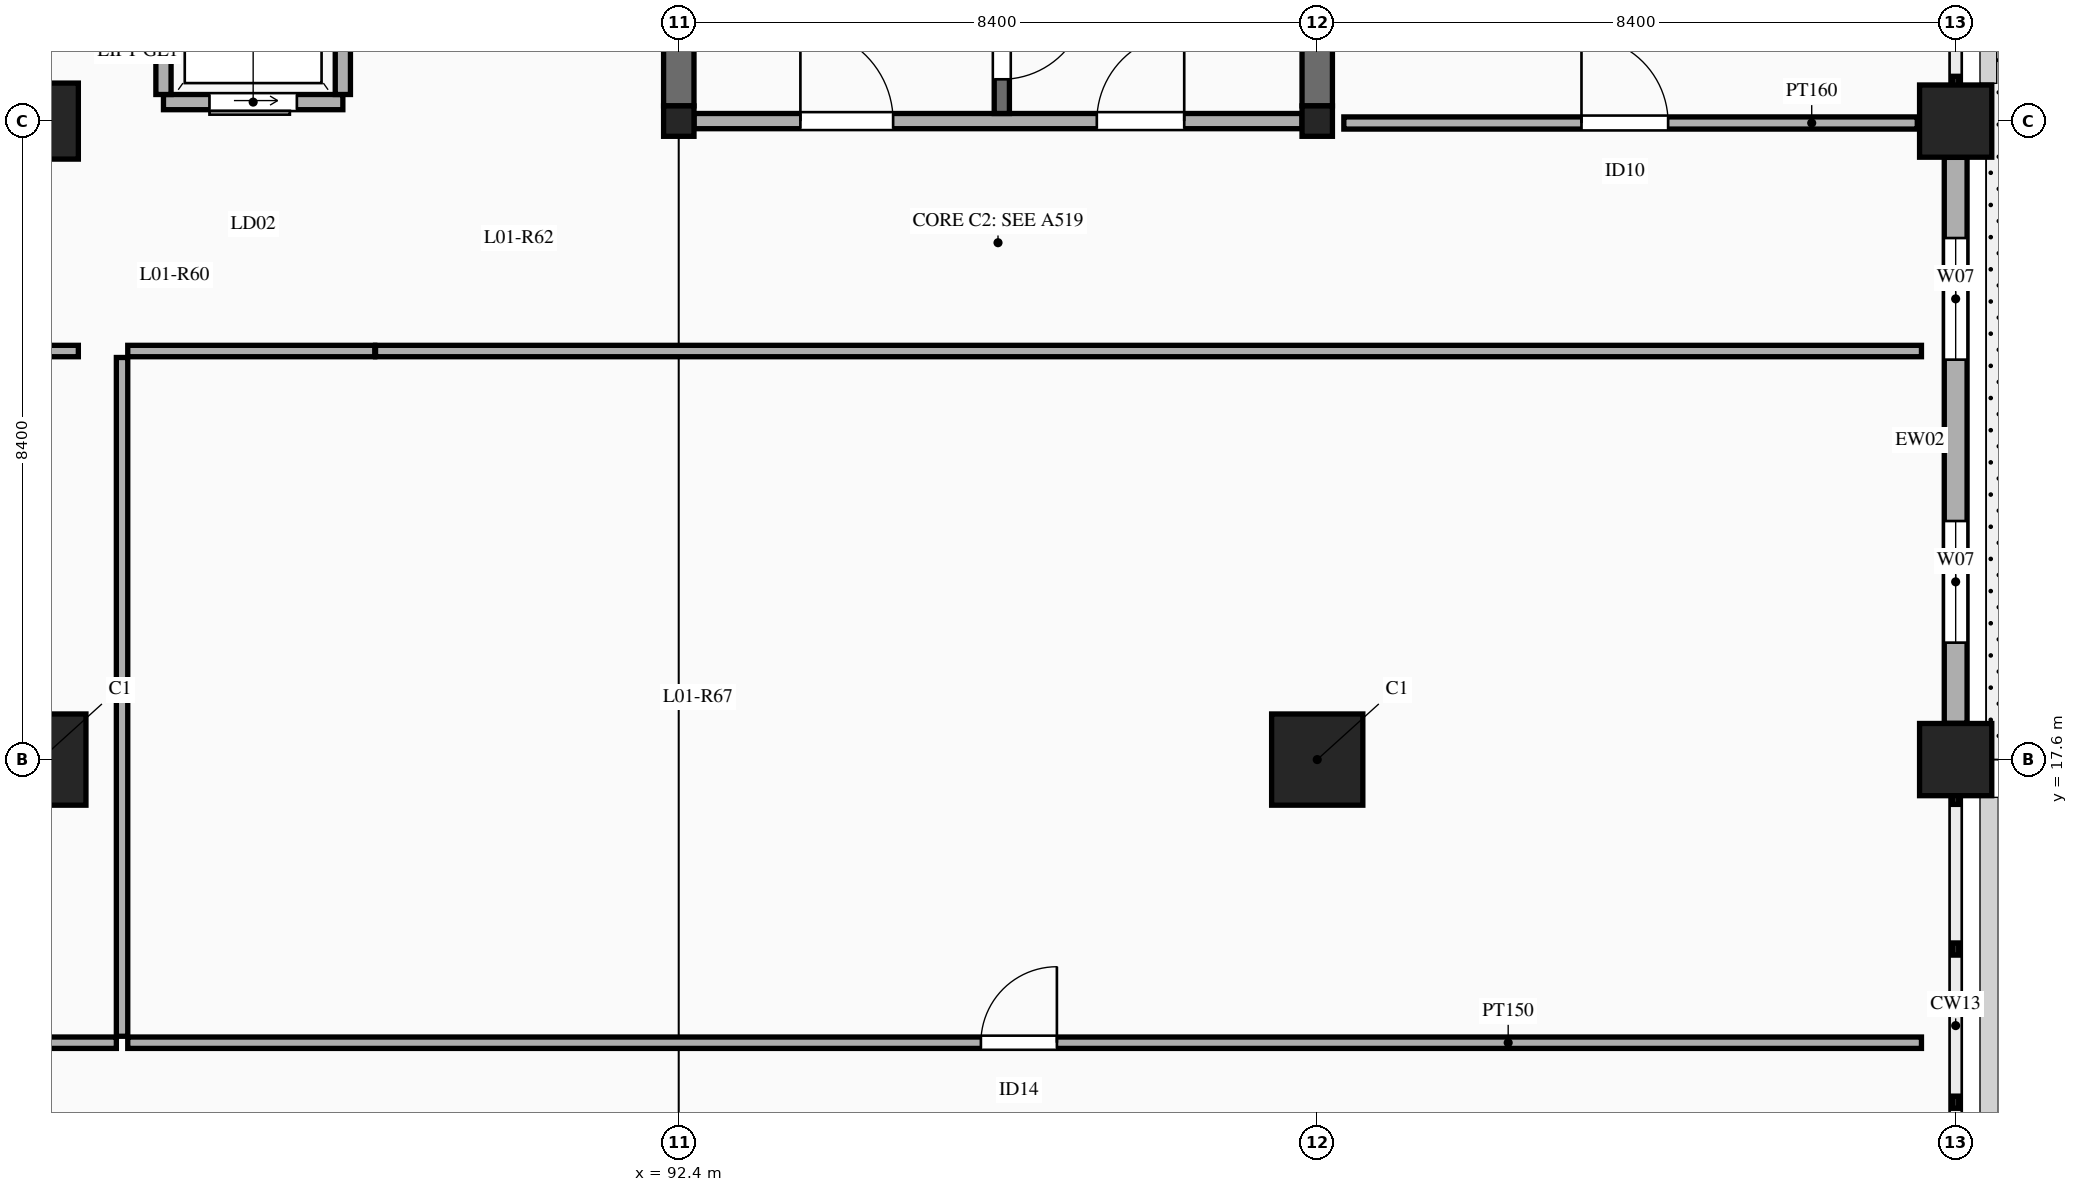
"""IFC4 building model, lengths in metres.
Left out: names, types, materials, properties, quantities, classifications, styles, units other than length and angle.
Written with IfcOpenShell. Run it as: python <this file> out.ifc"""

import sys

from ifc_helpers import new_model, si_unit, direction, frame, frame_2d, origin, origin_2d, place, context, subcontext, project, spatial, rectangle, extrude, element, fill, save


model = new_model("IFC4")
c1 = context("Model", 3, precision=1e-05, world=origin(), true_north=direction((0.0, 1.0)))
c2 = subcontext(c1, "Body", "Model", "MODEL_VIEW")
j1 = project(units=[si_unit("LENGTHUNIT", "METRE"), si_unit("PLANEANGLEUNIT", "RADIAN")], contexts=[c1])
p1 = place(None, origin())
s1 = spatial("IfcSite", under=j1, at=p1, CompositionType="ELEMENT")
p2 = place(p1, origin())
s2 = spatial("IfcBuilding", under=s1, at=p2, CompositionType="ELEMENT")
p3 = place(p2, frame((0.0, 0.0, 5.4)))
s3 = spatial("IfcBuildingStorey", under=s2, at=p3, CompositionType="ELEMENT", Elevation=5.4)
p4 = place(p3, frame((84.0, 17.6, 0.0), z_axis=(0.0, 0.0, 1.0), x_axis=(1.0, 0.0, 0.0)))
e1 = element("IfcColumn", 1, at=p4, inside=s3, PredefinedType="COLUMN", context=c2, shape_type="SweptSolid", body=[
    extrude(rectangle(XDim=1.2, YDim=1.2, at=origin_2d()), origin(), (0.0, 0.0, 1.0), 4.8),
])
p5 = place(p3, frame((84.0, 26.0, 0.0), z_axis=(0.0, 0.0, 1.0), x_axis=(1.0, 0.0, 0.0)))
e2 = element("IfcColumn", 2, at=p5, inside=s3, PredefinedType="COLUMN", context=c2, shape_type="SweptSolid", body=[
    extrude(rectangle(XDim=1.0, YDim=1.0, at=origin_2d()), origin(), (0.0, 0.0, 1.0), 4.8),
])
p6 = place(p3, frame((92.4, 26.0, 0.0), z_axis=(0.0, 0.0, 1.0), x_axis=(1.0, 0.0, 0.0)))
e3 = element("IfcColumn", 3, at=p6, inside=s3, PredefinedType="COLUMN", context=c2, shape_type="SweptSolid", body=[
    extrude(rectangle(XDim=0.4, YDim=0.4, at=origin_2d()), origin(), (0.0, 0.0, 1.0), 4.8),
])
p7 = place(p3, frame((100.8, 17.6, 0.0), z_axis=(0.0, 0.0, 1.0), x_axis=(1.0, 0.0, 0.0)))
e4 = element("IfcColumn", 4, at=p7, inside=s3, PredefinedType="COLUMN", context=c2, shape_type="SweptSolid", body=[
    extrude(rectangle(XDim=1.2, YDim=1.2, at=origin_2d()), origin(), (0.0, 0.0, 1.0), 4.8),
])
p8 = place(p3, frame((100.8, 26.0, 0.0), z_axis=(0.0, 0.0, 1.0), x_axis=(1.0, 0.0, 0.0)))
e5 = element("IfcColumn", 5, at=p8, inside=s3, PredefinedType="COLUMN", context=c2, shape_type="SweptSolid", body=[
    extrude(rectangle(XDim=0.4, YDim=0.4, at=origin_2d()), origin(), (0.0, 0.0, 1.0), 4.8),
])
for number, where, z_axis, x_axis in (
    (6, (109.2, 17.6, 0.0), (0.0, 0.0, 1.0), (1.0, 0.0, 0.0)),
    (7, (109.2, 26.0, 0.0), (0.0, 0.0, 1.0), (1.0, 0.0, 0.0)),
):
    element("IfcColumn", number, at=place(p3, frame(where, z_axis=z_axis, x_axis=x_axis)), inside=s3, PredefinedType="COLUMN", context=c2, shape_type="SweptSolid", body=[
        extrude(rectangle(XDim=0.95, YDim=0.95, at=origin_2d()), origin(), (0.0, 0.0, 1.0), 4.8),
    ])
for number, where, z_axis, x_axis in (
    (8, (92.4, 26.2, 0.0), (0.0, 0.0, 1.0), (0.0, 1.0, 0.0)),
    (9, (100.8, 26.2, 0.0), (0.0, 0.0, 1.0), (0.0, 1.0, 0.0)),
):
    element("IfcWall", number, at=place(p3, frame(where, z_axis=z_axis, x_axis=x_axis)), inside=s3, PredefinedType="SHEAR", context=c2, shape_type="SweptSolid", body=[
        extrude(rectangle(XDim=8.0, YDim=0.4, at=frame_2d((4.0, 0.0))), origin(), (0.0, 0.0, 1.0), 4.8),
    ])
p9 = place(p3, frame((109.2, 18.077, 0.0), z_axis=(0.0, 0.0, 1.0), x_axis=(0.0, 1.0, 0.0)))
e10 = element("IfcWall", 10, at=p9, inside=s3, PredefinedType="SOLIDWALL", context=c2, shape_type="SweptSolid", body=[
    extrude(rectangle(XDim=7.446, YDim=0.3, at=frame_2d((3.723, 0.0))), origin(), (0.0, 0.0, 1.0), 3.85),
])
p10 = place(p9, frame((1.062, 0.0, 0.9)))
e11 = element("IfcOpeningElement", 11, at=p10, cuts=e10, PredefinedType="OPENING", context=c2, shape_type="SweptSolid", body=[
    extrude(rectangle(XDim=1.6, YDim=2.1, at=frame_2d((0.8, 1.05))), frame((0.0, 0.16, 0.0), z_axis=(0.0, -1.0, 0.0), x_axis=(1.0, 0.0, 0.0)), (0.0, 0.0, 1.0), 0.32),
])
p11 = place(p9, frame((4.784, 0.0, 0.9)))
e12 = element("IfcOpeningElement", 12, at=p11, cuts=e10, PredefinedType="OPENING", context=c2, shape_type="SweptSolid", body=[
    extrude(rectangle(XDim=1.6, YDim=2.1, at=frame_2d((0.8, 1.05))), frame((0.0, 0.16, 0.0), z_axis=(0.0, -1.0, 0.0), x_axis=(1.0, 0.0, 0.0)), (0.0, 0.0, 1.0), 0.32),
])
p12 = place(p3, frame((92.6, 26.0, 0.0), z_axis=(0.0, 0.0, 1.0), x_axis=(1.0, 0.0, 0.0)))
e13 = element("IfcWall", 13, at=p12, inside=s3, PredefinedType="SOLIDWALL", context=c2, shape_type="SweptSolid", body=[
    extrude(rectangle(XDim=8.0, YDim=0.2, at=frame_2d((4.0, 0.0))), origin(), (0.0, 0.0, 1.0), 3.88),
])
p13 = place(p12, frame((1.4, 0.0, 0.0)))
e14 = element("IfcOpeningElement", 14, at=p13, cuts=e13, PredefinedType="OPENING", context=c2, shape_type="SweptSolid", body=[
    extrude(rectangle(XDim=1.22, YDim=2.15, at=frame_2d((0.61, 1.075))), frame((0.0, 0.11, 0.0), z_axis=(0.0, -1.0, 0.0), x_axis=(1.0, 0.0, 0.0)), (0.0, 0.0, 1.0), 0.22),
])
p14 = place(p12, frame((5.3, 0.0, 0.0)))
e15 = element("IfcOpeningElement", 15, at=p14, cuts=e13, PredefinedType="OPENING", context=c2, shape_type="SweptSolid", body=[
    extrude(rectangle(XDim=1.15, YDim=2.15, at=frame_2d((0.575, 1.075))), frame((0.0, 0.11, 0.0), z_axis=(0.0, -1.0, 0.0), x_axis=(1.0, 0.0, 0.0)), (0.0, 0.0, 1.0), 0.22),
])
p15 = place(p3, frame((96.65, 26.1, 0.0), z_axis=(0.0, 0.0, 1.0), x_axis=(0.0, 1.0, 0.0)))
e16 = element("IfcWall", 16, at=p15, inside=s3, PredefinedType="SOLIDWALL", context=c2, shape_type="SweptSolid", body=[
    extrude(rectangle(XDim=8.1, YDim=0.2, at=frame_2d((4.05, 0.0))), origin(), (0.0, 0.0, 1.0), 4.58),
])
p16 = place(p15, frame((0.45, 0.0, 0.0)))
e17 = element("IfcOpeningElement", 17, at=p16, cuts=e16, PredefinedType="OPENING", context=c2, shape_type="SweptSolid", body=[
    extrude(rectangle(XDim=1.12, YDim=2.15, at=frame_2d((0.56, 1.075))), frame((0.0, 0.11, 0.0), z_axis=(0.0, -1.0, 0.0), x_axis=(1.0, 0.0, 0.0)), (0.0, 0.0, 1.0), 0.22),
])
p17 = place(p3, frame((85.62, 26.25, 0.0), z_axis=(0.0, 0.0, 1.0), x_axis=(1.0, 0.0, 0.0)))
e18 = element("IfcWall", 18, at=p17, inside=s3, PredefinedType="SOLIDWALL", context=c2, shape_type="SweptSolid", body=[
    extrude(rectangle(XDim=2.36, YDim=0.2, at=frame_2d((1.18, 0.0))), origin(), (0.0, 0.0, 1.0), 3.88),
])
p18 = place(p17, frame((0.605, 0.0, 0.0)))
e19 = element("IfcOpeningElement", 19, at=p18, cuts=e18, PredefinedType="OPENING", context=c2, shape_type="SweptSolid", body=[
    extrude(rectangle(XDim=1.15, YDim=2.2, at=frame_2d((0.575, 1.1))), frame((0.0, 0.11, 0.0), z_axis=(0.0, -1.0, 0.0), x_axis=(1.0, 0.0, 0.0)), (0.0, 0.0, 1.0), 0.22),
])
p19 = place(p3, frame((85.62, 26.35, 0.0), z_axis=(0.0, 0.0, 1.0), x_axis=(0.0, 1.0, 0.0)))
e20 = element("IfcWall", 20, at=p19, inside=s3, PredefinedType="SOLIDWALL", context=c2, shape_type="SweptSolid", body=[
    extrude(rectangle(XDim=2.9, YDim=0.2, at=frame_2d((1.45, 0.0))), origin(), (0.0, 0.0, 1.0), 4.58),
])
p20 = place(p3, frame((87.98, 26.35, 0.0), z_axis=(0.0, 0.0, 1.0), x_axis=(0.0, 1.0, 0.0)))
e21 = element("IfcWall", 21, at=p20, inside=s3, PredefinedType="SOLIDWALL", context=c2, shape_type="SweptSolid", body=[
    extrude(rectangle(XDim=2.9, YDim=0.2, at=frame_2d((1.45, 0.0))), origin(), (0.0, 0.0, 1.0), 4.23),
])
p21 = place(p3, frame((101.15, 25.975, 0.0), z_axis=(0.0, 0.0, 1.0), x_axis=(1.0, 0.0, 0.0)))
e22 = element("IfcWall", 22, at=p21, inside=s3, PredefinedType="PARTITIONING", context=c2, shape_type="SweptSolid", body=[
    extrude(rectangle(XDim=7.545, YDim=0.16, at=frame_2d((3.772, 0.0))), origin(), (0.0, 0.0, 1.0), 2.95),
])
p22 = place(p21, frame((3.127, 0.0, 0.0)))
e23 = element("IfcOpeningElement", 23, at=p22, cuts=e22, PredefinedType="OPENING", context=c2, shape_type="SweptSolid", body=[
    extrude(rectangle(XDim=1.14, YDim=2.22, at=frame_2d((0.57, 1.11))), frame((0.0, 0.09, 0.0), z_axis=(0.0, -1.0, 0.0), x_axis=(1.0, 0.0, 0.0)), (0.0, 0.0, 1.0), 0.18),
])
p23 = place(p3, frame((76.05, 22.975, 0.0), z_axis=(0.0, 0.0, 1.0), x_axis=(1.0, 0.0, 0.0)))
e24 = element("IfcWall", 24, at=p23, inside=s3, PredefinedType="PARTITIONING", context=c2, shape_type="SweptSolid", body=[
    extrude(rectangle(XDim=8.45, YDim=0.15, at=frame_2d((4.225, 0.0))), origin(), (0.0, 0.0, 1.0), 2.95),
])
p24 = place(p3, frame((85.15, 22.975, 0.0), z_axis=(0.0, 0.0, 1.0), x_axis=(1.0, 0.0, 0.0)))
e25 = element("IfcWall", 25, at=p24, inside=s3, PredefinedType="PARTITIONING", context=c2, shape_type="SweptSolid", body=[
    extrude(rectangle(XDim=3.25, YDim=0.15, at=frame_2d((1.625, 0.0))), origin(), (0.0, 0.0, 1.0), 2.95),
])
p25 = place(p3, frame((88.41, 22.975, 0.0), z_axis=(0.0, 0.0, 1.0), x_axis=(1.0, 0.0, 0.0)))
e26 = element("IfcWall", 26, at=p25, inside=s3, PredefinedType="PARTITIONING", context=c2, shape_type="SweptSolid", body=[
    extrude(rectangle(XDim=20.34, YDim=0.15, at=frame_2d((10.17, 0.0))), origin(), (0.0, 0.0, 1.0), 2.95),
])
p26 = place(p3, frame((63.56, 13.875, 0.0), z_axis=(0.0, 0.0, 1.0), x_axis=(1.0, 0.0, 0.0)))
e27 = element("IfcWall", 27, at=p26, inside=s3, PredefinedType="PARTITIONING", context=c2, shape_type="SweptSolid", body=[
    extrude(rectangle(XDim=21.44, YDim=0.15, at=frame_2d((10.72, 0.0))), origin(), (0.0, 0.0, 1.0), 2.95),
])
p27 = place(p26, frame((9.123, 0.0, 0.0)))
e28 = element("IfcOpeningElement", 28, at=p27, cuts=e27, PredefinedType="OPENING", context=c2, shape_type="SweptSolid", body=[
    extrude(rectangle(XDim=1.24, YDim=2.2, at=frame_2d((0.62, 1.1))), frame((0.0, 0.085, 0.0), z_axis=(0.0, -1.0, 0.0), x_axis=(1.0, 0.0, 0.0)), (0.0, 0.0, 1.0), 0.17),
])
p28 = place(p3, frame((85.15, 13.875, 0.0), z_axis=(0.0, 0.0, 1.0), x_axis=(1.0, 0.0, 0.0)))
e29 = element("IfcWall", 29, at=p28, inside=s3, PredefinedType="PARTITIONING", context=c2, shape_type="SweptSolid", body=[
    extrude(rectangle(XDim=23.6, YDim=0.15, at=frame_2d((11.8, 0.0))), origin(), (0.0, 0.0, 1.0), 2.95),
])
p29 = place(p28, frame((11.225, 0.0, 0.0)))
e30 = element("IfcOpeningElement", 30, at=p29, cuts=e29, PredefinedType="OPENING", context=c2, shape_type="SweptSolid", body=[
    extrude(rectangle(XDim=1.0, YDim=2.15, at=frame_2d((0.5, 1.075))), frame((0.0, 0.085, 0.0), z_axis=(0.0, -1.0, 0.0), x_axis=(1.0, 0.0, 0.0)), (0.0, 0.0, 1.0), 0.17),
])
p30 = place(p3, frame((85.075, 13.96, 0.0), z_axis=(0.0, 0.0, 1.0), x_axis=(0.0, 1.0, 0.0)))
e31 = element("IfcWall", 31, at=p30, inside=s3, PredefinedType="PARTITIONING", context=c2, shape_type="SweptSolid", body=[
    extrude(rectangle(XDim=8.93, YDim=0.15, at=frame_2d((4.465, 0.0))), origin(), (0.0, 0.0, 1.0), 2.95),
])
p31 = place(p10, origin())
e32 = element("IfcWindow", 32, at=p31, inside=s3, PartitioningType="DOUBLE_PANEL_VERTICAL", PredefinedType="WINDOW", context=c2, shape_type="SweptSolid", body=[
    extrude(rectangle(XDim=1.6, YDim=2.1, at=frame_2d((0.8, 1.05))), frame((0.0, 0.03, 0.0), z_axis=(0.0, -1.0, 0.0), x_axis=(1.0, 0.0, 0.0)), (0.0, 0.0, 1.0), 0.06),
])
fill(e11, e32)
p32 = place(p11, origin())
e33 = element("IfcWindow", 33, at=p32, inside=s3, PartitioningType="DOUBLE_PANEL_VERTICAL", PredefinedType="WINDOW", context=c2, shape_type="SweptSolid", body=[
    extrude(rectangle(XDim=1.6, YDim=2.1, at=frame_2d((0.8, 1.05))), frame((0.0, 0.03, 0.0), z_axis=(0.0, -1.0, 0.0), x_axis=(1.0, 0.0, 0.0)), (0.0, 0.0, 1.0), 0.06),
])
fill(e12, e33)
p33 = place(p13, origin())
e34 = element("IfcDoor", 34, at=p33, inside=s3, OperationType="SINGLE_SWING_LEFT", PredefinedType="DOOR", context=c2, shape_type="SweptSolid", body=[
    extrude(rectangle(XDim=1.22, YDim=2.15, at=frame_2d((0.61, 1.075))), frame((0.0, 0.025, 0.0), z_axis=(0.0, -1.0, 0.0), x_axis=(1.0, 0.0, 0.0)), (0.0, 0.0, 1.0), 0.05),
])
fill(e14, e34)
p34 = place(p14, origin())
e35 = element("IfcDoor", 35, at=p34, inside=s3, OperationType="SINGLE_SWING_RIGHT", PredefinedType="DOOR", context=c2, shape_type="SweptSolid", body=[
    extrude(rectangle(XDim=1.15, YDim=2.15, at=frame_2d((0.575, 1.075))), frame((0.0, 0.025, 0.0), z_axis=(0.0, -1.0, 0.0), x_axis=(1.0, 0.0, 0.0)), (0.0, 0.0, 1.0), 0.05),
])
fill(e15, e35)
p35 = place(p16, frame((1.12, 0.0, 0.0), z_axis=(0.0, 0.0, 1.0), x_axis=(-1.0, 0.0, 0.0)))
e36 = element("IfcDoor", 36, at=p35, inside=s3, OperationType="SINGLE_SWING_LEFT", PredefinedType="DOOR", context=c2, shape_type="SweptSolid", body=[
    extrude(rectangle(XDim=1.12, YDim=2.15, at=frame_2d((0.56, 1.075))), frame((0.0, 0.025, 0.0), z_axis=(0.0, -1.0, 0.0), x_axis=(1.0, 0.0, 0.0)), (0.0, 0.0, 1.0), 0.05),
])
fill(e17, e36)
p36 = place(p18, frame((1.15, 0.0, 0.0), z_axis=(0.0, 0.0, 1.0), x_axis=(-1.0, 0.0, 0.0)))
e37 = element("IfcDoor", 37, at=p36, inside=s3, OperationType="SLIDING_TO_LEFT", PredefinedType="DOOR", context=c2, shape_type="SweptSolid", body=[
    extrude(rectangle(XDim=1.15, YDim=2.2, at=frame_2d((0.575, 1.1))), frame((0.0, 0.025, 0.0), z_axis=(0.0, -1.0, 0.0), x_axis=(1.0, 0.0, 0.0)), (0.0, 0.0, 1.0), 0.05),
])
fill(e19, e37)
p37 = place(p22, origin())
e38 = element("IfcDoor", 38, at=p37, inside=s3, OperationType="SINGLE_SWING_LEFT", PredefinedType="DOOR", context=c2, shape_type="SweptSolid", body=[
    extrude(rectangle(XDim=1.14, YDim=2.22, at=frame_2d((0.57, 1.11))), frame((0.0, 0.025, 0.0), z_axis=(0.0, -1.0, 0.0), x_axis=(1.0, 0.0, 0.0)), (0.0, 0.0, 1.0), 0.05),
])
fill(e23, e38)
p38 = place(p29, origin())
e39 = element("IfcDoor", 39, at=p38, inside=s3, OperationType="SINGLE_SWING_RIGHT", PredefinedType="DOOR", context=c2, shape_type="SweptSolid", body=[
    extrude(rectangle(XDim=1.0, YDim=2.15, at=frame_2d((0.5, 1.075))), frame((0.0, 0.025, 0.0), z_axis=(0.0, -1.0, 0.0), x_axis=(1.0, 0.0, 0.0)), (0.0, 0.0, 1.0), 0.05),
])
fill(e30, e39)
save(model, sys.argv[1])
